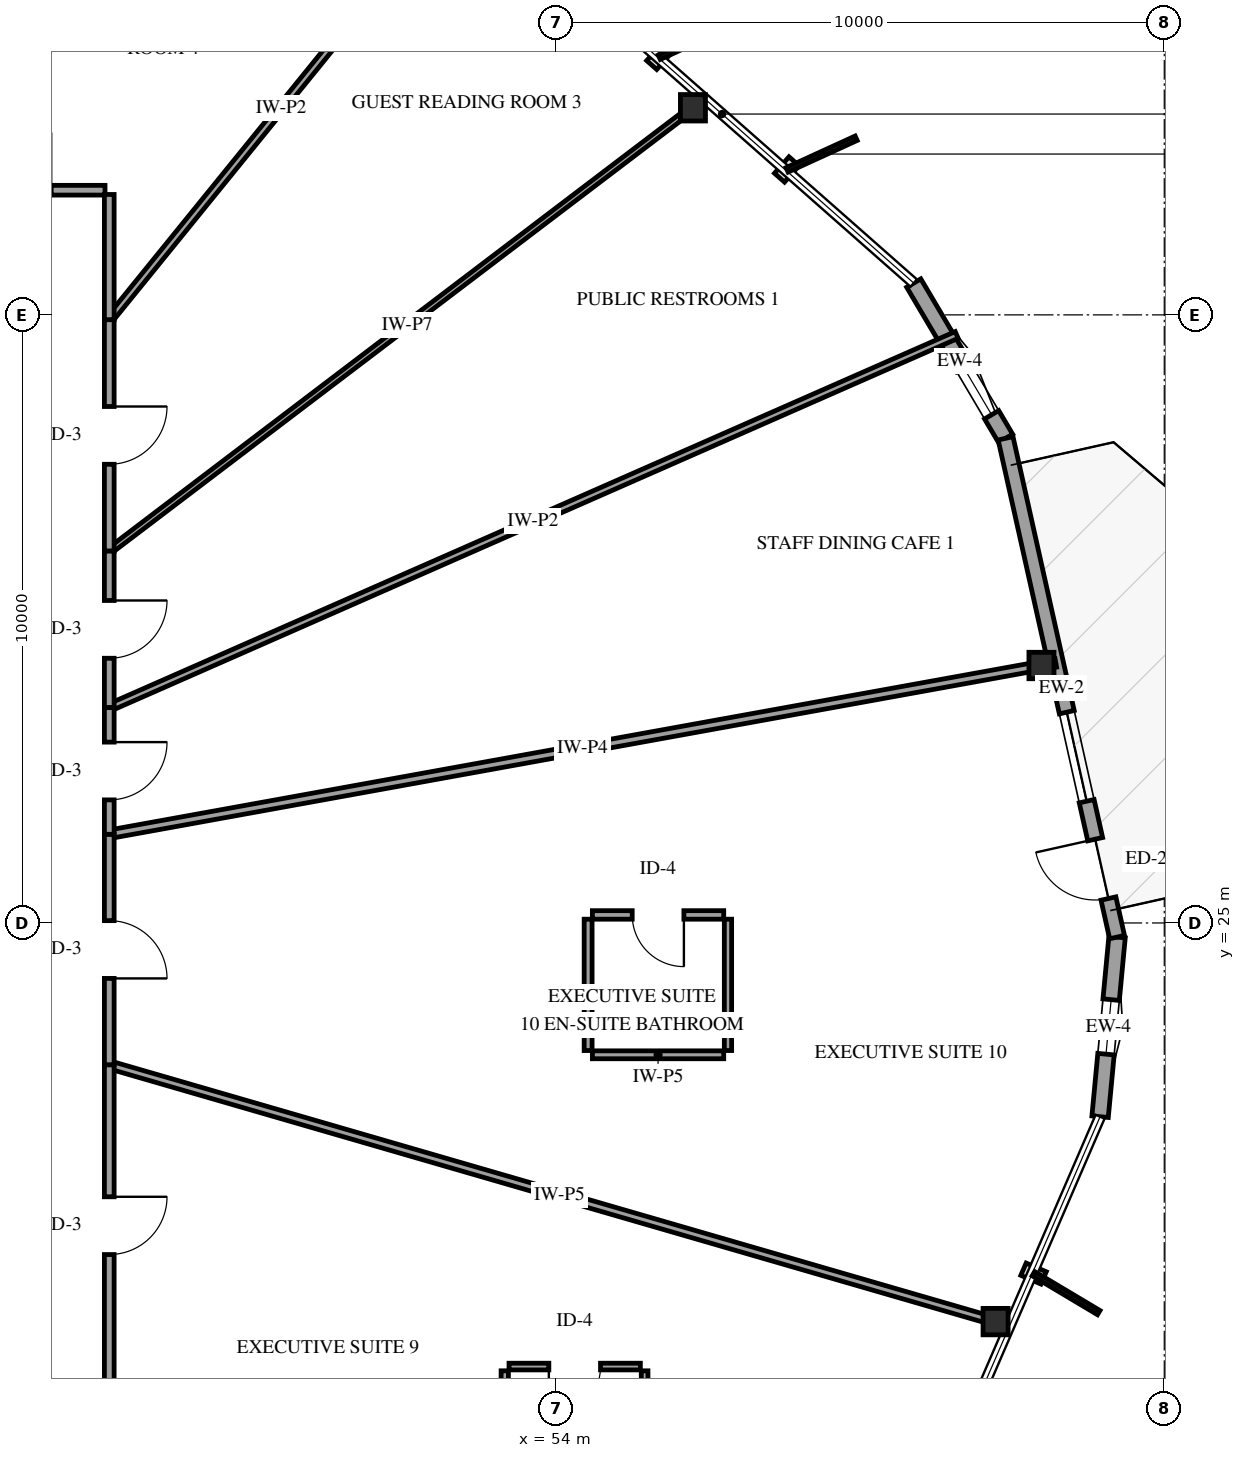
"""IFC4 building model, lengths in metres.
Left out: names, types, materials, properties, quantities, classifications, styles, units other than length and angle.
Written with IfcOpenShell. Run it as: python <this file> out.ifc"""

import sys

from ifc_helpers import new_model, si_unit, direction, frame, frame_2d, origin, origin_2d, place, context, subcontext, project, spatial, rectangle, i_section, extrude, element, fill, save


model = new_model("IFC4")
c1 = context("Model", 3, precision=1e-05, world=origin(), true_north=direction((0.0, 1.0)))
c2 = subcontext(c1, "Body", "Model", "MODEL_VIEW")
j1 = project(units=[si_unit("LENGTHUNIT", "METRE"), si_unit("PLANEANGLEUNIT", "RADIAN")], contexts=[c1])
p1 = place(None, origin())
s1 = spatial("IfcSite", under=j1, at=p1, CompositionType="ELEMENT")
p2 = place(p1, origin())
s2 = spatial("IfcBuilding", under=s1, at=p2, CompositionType="ELEMENT")
p3 = place(p2, frame((0.0, 0.0, 146.2)))
s3 = spatial("IfcBuildingStorey", under=s2, at=p3, CompositionType="ELEMENT", Elevation=146.2)
for number, where, z_axis, x_axis in (
    (1, (61.98, 29.234, 0.0), (0.0, 0.0, 1.0), (1.0, 0.0, 0.0)),
    (2, (56.249, 38.406, 0.0), (0.0, 0.0, 1.0), (1.0, 0.0, 0.0)),
    (3, (61.226, 18.444, 0.0), (0.0, 0.0, 1.0), (1.0, 0.0, 0.0)),
):
    element("IfcColumn", number, at=place(p3, frame(where, z_axis=z_axis, x_axis=x_axis)), inside=s3, PredefinedType="COLUMN", context=c2, shape_type="SweptSolid", body=[
        extrude(i_section(OverallWidth=0.412, OverallDepth=0.435, WebThickness=0.036, FlangeThickness=0.057, FilletRadius=0.038, at=origin_2d()), origin(), (0.0, 0.0, 1.0), 3.6),
    ])
p4 = place(p3, frame((62.944, 21.814, 0.0), z_axis=(0.0, 0.0, 1.0), x_axis=(0.094148838896, 0.995558132976, 0.0)))
e4 = element("IfcWall", 4, at=p4, inside=s3, PredefinedType="SOLIDWALL", context=c2, shape_type="SweptSolid", body=[
    extrude(rectangle(XDim=2.967, YDim=0.27, at=frame_2d((1.483, 0.0))), origin(), (0.0, 0.0, 1.0), 2.679),
])
p5 = place(p4, frame((1.033, 0.0, 0.75)))
e5 = element("IfcOpeningElement", 5, at=p5, cuts=e4, PredefinedType="OPENING", context=c2, shape_type="SweptSolid", body=[
    extrude(rectangle(XDim=0.9, YDim=1.5, at=frame_2d((0.45, 0.75))), frame((0.0, 0.145, 0.0), z_axis=(0.0, -1.0, 0.0), x_axis=(1.0, 0.0, 0.0)), (0.0, 0.0, 1.0), 0.29),
])
p6 = place(p3, frame((61.39, 32.97, 0.0), z_axis=(0.0, 0.0, 1.0), x_axis=(-0.509075841799, 0.860721666566, 0.0)))
e6 = element("IfcWall", 6, at=p6, inside=s3, PredefinedType="SOLIDWALL", context=c2, shape_type="SweptSolid", body=[
    extrude(rectangle(XDim=2.967, YDim=0.27, at=frame_2d((1.483, 0.0))), origin(), (0.0, 0.0, 1.0), 2.679),
])
p7 = place(p6, frame((0.45, 0.0, 0.75)))
e7 = element("IfcOpeningElement", 7, at=p7, cuts=e6, PredefinedType="OPENING", context=c2, shape_type="SweptSolid", body=[
    extrude(rectangle(XDim=0.9, YDim=1.5, at=frame_2d((0.45, 0.75))), frame((0.0, 0.145, 0.0), z_axis=(0.0, -1.0, 0.0), x_axis=(1.0, 0.0, 0.0)), (0.0, 0.0, 1.0), 0.29),
])
p8 = place(p3, frame((63.224, 24.767, 0.0), z_axis=(0.0, 0.0, 1.0), x_axis=(-0.218148242033, 0.975915644151, 0.0)))
e8 = element("IfcWall", 8, at=p8, inside=s3, PredefinedType="SOLIDWALL", context=c2, shape_type="SweptSolid", body=[
    extrude(rectangle(XDim=8.405, YDim=0.25, at=frame_2d((4.202, 0.0))), origin(), (0.0, 0.0, 1.0), 2.679),
])
p9 = place(p8, frame((0.65, 0.0, 0.0)))
e9 = element("IfcOpeningElement", 9, at=p9, cuts=e8, PredefinedType="OPENING", context=c2, shape_type="SweptSolid", body=[
    extrude(rectangle(XDim=1.0, YDim=2.15, at=frame_2d((0.5, 1.075))), frame((0.0, 0.135, 0.0), z_axis=(0.0, -1.0, 0.0), x_axis=(1.0, 0.0, 0.0)), (0.0, 0.0, 1.0), 0.27),
])
p10 = place(p8, frame((2.29, 0.0, 0.72)))
e10 = element("IfcOpeningElement", 10, at=p10, cuts=e8, PredefinedType="OPENING", context=c2, shape_type="SweptSolid", body=[
    extrude(rectangle(XDim=1.5, YDim=1.7, at=frame_2d((0.75, 0.85))), frame((0.0, 0.135, 0.0), z_axis=(0.0, -1.0, 0.0), x_axis=(1.0, 0.0, 0.0)), (0.0, 0.0, 1.0), 0.27),
])
p11 = place(p3, frame((62.216, 29.276, 0.0), z_axis=(0.0, 0.0, 1.0), x_axis=(-0.984006914284, -0.178130268741, 0.0)))
e11 = element("IfcWall", 11, at=p11, inside=s3, PredefinedType="PARTITIONING", context=c2, shape_type="SweptSolid", body=[
    extrude(rectangle(XDim=15.819, YDim=0.14, at=frame_2d((7.91, 0.0))), origin(), (0.0, 0.0, 1.0), 2.595),
])
p12 = place(p3, frame((46.65, 22.668, 0.0), z_axis=(0.0, 0.0, 1.0), x_axis=(0.96048207522, -0.278341845904, 0.0)))
e12 = element("IfcWall", 12, at=p12, inside=s3, PredefinedType="PARTITIONING", context=c2, shape_type="SweptSolid", body=[
    extrude(rectangle(XDim=15.416, YDim=0.13, at=frame_2d((7.708, 0.0))), origin(), (0.0, 0.0, 1.0), 3.3),
])
p13 = place(p3, frame((46.65, 28.541, 0.0), z_axis=(0.0, 0.0, 1.0), x_axis=(0.915386429194, 0.402576309844, 0.0)))
e13 = element("IfcWall", 13, at=p13, inside=s3, PredefinedType="PARTITIONING", context=c2, shape_type="SweptSolid", body=[
    extrude(rectangle(XDim=15.224, YDim=0.12, at=frame_2d((7.612, 0.0))), origin(), (0.0, 0.0, 1.0), 3.3),
])
p14 = place(p3, frame((46.65, 31.115, 0.0), z_axis=(0.0, 0.0, 1.0), x_axis=(0.796314037098, 0.604883422092, 0.0)))
e14 = element("IfcWall", 14, at=p14, inside=s3, PredefinedType="PARTITIONING", context=c2, shape_type="SweptSolid", body=[
    extrude(rectangle(XDim=12.298, YDim=0.1, at=frame_2d((6.149, 0.0))), origin(), (0.0, 0.0, 1.0), 3.3),
])
p15 = place(p3, frame((46.65, 34.921, 0.0), z_axis=(0.0, 0.0, 1.0), x_axis=(0.630132507275, 0.776487619524, 0.0)))
e15 = element("IfcWall", 15, at=p15, inside=s3, PredefinedType="PARTITIONING", context=c2, shape_type="SweptSolid", body=[
    extrude(rectangle(XDim=8.971, YDim=0.12, at=frame_2d((4.486, 0.0))), origin(), (0.0, 0.0, 1.0), 2.678),
])
p16 = place(p3, frame((43.86, 37.05, 0.0), z_axis=(0.0, 0.0, 1.0), x_axis=(0.400046288898, 0.916494935468, 0.0)))
e16 = element("IfcWall", 16, at=p16, inside=s3, PredefinedType="PARTITIONING", context=c2, shape_type="SweptSolid", body=[
    extrude(rectangle(XDim=6.152, YDim=0.14, at=frame_2d((3.076, 0.0))), origin(), (0.0, 0.0, 1.0), 2.595),
])
p17 = place(p3, frame((46.65, 22.668, 0.0), z_axis=(0.0, 0.0, 1.0), x_axis=(0.0, -1.0, 0.0)))
e17 = element("IfcWall", 17, at=p17, inside=s3, PredefinedType="PARTITIONING", context=c2, shape_type="SweptSolid", body=[
    extrude(rectangle(XDim=5.291, YDim=0.16, at=frame_2d((2.646, 0.0))), origin(), (0.0, 0.0, 1.0), 3.3),
])
p18 = place(p17, frame((2.171, 0.0, 0.0)))
e18 = element("IfcOpeningElement", 18, at=p18, cuts=e17, PredefinedType="OPENING", context=c2, shape_type="SweptSolid", body=[
    extrude(rectangle(XDim=0.95, YDim=2.15, at=frame_2d((0.475, 1.075))), frame((0.0, 0.09, 0.0), z_axis=(0.0, -1.0, 0.0), x_axis=(1.0, 0.0, 0.0)), (0.0, 0.0, 1.0), 0.18),
])
p19 = place(p3, frame((46.65, 34.921, 0.0), z_axis=(0.0, 0.0, 1.0), x_axis=(0.0, -1.0, 0.0)))
e19 = element("IfcWall", 19, at=p19, inside=s3, PredefinedType="PARTITIONING", context=c2, shape_type="SweptSolid", body=[
    extrude(rectangle(XDim=3.806, YDim=0.16, at=frame_2d((1.903, 0.0))), origin(), (0.0, 0.0, 1.0), 3.3),
])
p20 = place(p19, frame((1.428, 0.0, 0.0)))
e20 = element("IfcOpeningElement", 20, at=p20, cuts=e19, PredefinedType="OPENING", context=c2, shape_type="SweptSolid", body=[
    extrude(rectangle(XDim=0.95, YDim=2.15, at=frame_2d((0.475, 1.075))), frame((0.0, 0.09, 0.0), z_axis=(0.0, -1.0, 0.0), x_axis=(1.0, 0.0, 0.0)), (0.0, 0.0, 1.0), 0.18),
])
p21 = place(p3, frame((46.65, 26.458, 0.0), z_axis=(0.0, 0.0, 1.0), x_axis=(0.0, -1.0, 0.0)))
e21 = element("IfcWall", 21, at=p21, inside=s3, PredefinedType="PARTITIONING", context=c2, shape_type="SweptSolid", body=[
    extrude(rectangle(XDim=3.79, YDim=0.16, at=frame_2d((1.895, 0.0))), origin(), (0.0, 0.0, 1.0), 3.3),
])
p22 = place(p21, frame((1.42, 0.0, 0.0)))
e22 = element("IfcOpeningElement", 22, at=p22, cuts=e21, PredefinedType="OPENING", context=c2, shape_type="SweptSolid", body=[
    extrude(rectangle(XDim=0.95, YDim=2.15, at=frame_2d((0.475, 1.075))), frame((0.0, 0.09, 0.0), z_axis=(0.0, -1.0, 0.0), x_axis=(1.0, 0.0, 0.0)), (0.0, 0.0, 1.0), 0.18),
])
p23 = place(p3, frame((43.86, 37.05, 0.0), z_axis=(0.0, 0.0, 1.0), x_axis=(1.0, 0.0, 0.0)))
e23 = element("IfcWall", 23, at=p23, inside=s3, PredefinedType="PARTITIONING", context=c2, shape_type="SweptSolid", body=[
    extrude(rectangle(XDim=2.72, YDim=0.16, at=frame_2d((1.36, 0.0))), origin(), (0.0, 0.0, 1.0), 3.3),
])
p24 = place(p23, frame((0.885, 0.0, 0.0)))
e24 = element("IfcOpeningElement", 24, at=p24, cuts=e23, PredefinedType="OPENING", context=c2, shape_type="SweptSolid", body=[
    extrude(rectangle(XDim=0.95, YDim=2.15, at=frame_2d((0.475, 1.075))), frame((0.0, 0.09, 0.0), z_axis=(0.0, -1.0, 0.0), x_axis=(1.0, 0.0, 0.0)), (0.0, 0.0, 1.0), 0.18),
])
p25 = place(p3, frame((46.65, 31.115, 0.0), z_axis=(0.0, 0.0, 1.0), x_axis=(0.0, -1.0, 0.0)))
e25 = element("IfcWall", 25, at=p25, inside=s3, PredefinedType="PARTITIONING", context=c2, shape_type="SweptSolid", body=[
    extrude(rectangle(XDim=2.574, YDim=0.16, at=frame_2d((1.287, 0.0))), origin(), (0.0, 0.0, 1.0), 3.3),
])
p26 = place(p25, frame((0.812, 0.0, 0.0)))
e26 = element("IfcOpeningElement", 26, at=p26, cuts=e25, PredefinedType="OPENING", context=c2, shape_type="SweptSolid", body=[
    extrude(rectangle(XDim=0.95, YDim=2.15, at=frame_2d((0.475, 1.075))), frame((0.0, 0.09, 0.0), z_axis=(0.0, -1.0, 0.0), x_axis=(1.0, 0.0, 0.0)), (0.0, 0.0, 1.0), 0.18),
])
p27 = place(p3, frame((55.384, 17.705, 0.0), z_axis=(0.0, 0.0, 1.0), x_axis=(-1.0, 0.0, 0.0)))
e27 = element("IfcWall", 27, at=p27, inside=s3, PredefinedType="PARTITIONING", context=c2, shape_type="SweptSolid", body=[
    extrude(rectangle(XDim=2.16, YDim=0.11, at=frame_2d((1.08, 0.0))), origin(), (0.0, 0.0, 1.0), 3.3),
])
p28 = place(p27, frame((0.655, 0.0, 0.0)))
e28 = element("IfcOpeningElement", 28, at=p28, cuts=e27, PredefinedType="OPENING", context=c2, shape_type="SweptSolid", body=[
    extrude(rectangle(XDim=0.85, YDim=2.1, at=frame_2d((0.425, 1.05))), frame((0.0, 0.065, 0.0), z_axis=(0.0, -1.0, 0.0), x_axis=(1.0, 0.0, 0.0)), (0.0, 0.0, 1.0), 0.13),
])
p29 = place(p3, frame((56.755, 25.132, 0.0), z_axis=(0.0, 0.0, 1.0), x_axis=(-1.0, 0.0, 0.0)))
e29 = element("IfcWall", 29, at=p29, inside=s3, PredefinedType="PARTITIONING", context=c2, shape_type="SweptSolid", body=[
    extrude(rectangle(XDim=2.16, YDim=0.14, at=frame_2d((1.08, 0.0))), origin(), (0.0, 0.0, 1.0), 3.3),
])
p30 = place(p29, frame((0.655, 0.0, 0.0)))
e30 = element("IfcOpeningElement", 30, at=p30, cuts=e29, PredefinedType="OPENING", context=c2, shape_type="SweptSolid", body=[
    extrude(rectangle(XDim=0.85, YDim=2.1, at=frame_2d((0.425, 1.05))), frame((0.0, 0.08, 0.0), z_axis=(0.0, -1.0, 0.0), x_axis=(1.0, 0.0, 0.0)), (0.0, 0.0, 1.0), 0.16),
])
p31 = place(p3, frame((54.595, 22.832, 0.0), z_axis=(0.0, 0.0, 1.0), x_axis=(1.0, 0.0, 0.0)))
e31 = element("IfcWall", 31, at=p31, inside=s3, PredefinedType="PARTITIONING", context=c2, shape_type="SweptSolid", body=[
    extrude(rectangle(XDim=2.16, YDim=0.13, at=frame_2d((1.08, 0.0))), origin(), (0.0, 0.0, 1.0), 3.3),
])
p32 = place(p3, frame((53.154, 17.635, 0.0), z_axis=(0.0, 0.0, 1.0), x_axis=(0.0, -1.0, 0.0)))
e32 = element("IfcWall", 32, at=p32, inside=s3, PredefinedType="PARTITIONING", context=c2, shape_type="SweptSolid", body=[
    extrude(rectangle(XDim=2.16, YDim=0.12, at=frame_2d((1.08, 0.0))), origin(), (0.0, 0.0, 1.0), 3.3),
])
p33 = place(p3, frame((55.454, 15.475, 0.0), z_axis=(0.0, 0.0, 1.0), x_axis=(0.0, 1.0, 0.0)))
e33 = element("IfcWall", 33, at=p33, inside=s3, PredefinedType="PARTITIONING", context=c2, shape_type="SweptSolid", body=[
    extrude(rectangle(XDim=2.16, YDim=0.11, at=frame_2d((1.08, 0.0))), origin(), (0.0, 0.0, 1.0), 3.3),
])
p34 = place(p3, frame((54.525, 25.062, 0.0), z_axis=(0.0, 0.0, 1.0), x_axis=(0.0, -1.0, 0.0)))
e34 = element("IfcWall", 34, at=p34, inside=s3, PredefinedType="PARTITIONING", context=c2, shape_type="SweptSolid", body=[
    extrude(rectangle(XDim=2.16, YDim=0.13, at=frame_2d((1.08, 0.0))), origin(), (0.0, 0.0, 1.0), 3.3),
])
p35 = place(p3, frame((56.825, 22.902, 0.0), z_axis=(0.0, 0.0, 1.0), x_axis=(0.0, 1.0, 0.0)))
e35 = element("IfcWall", 35, at=p35, inside=s3, PredefinedType="PARTITIONING", context=c2, shape_type="SweptSolid", body=[
    extrude(rectangle(XDim=2.16, YDim=0.12, at=frame_2d((1.08, 0.0))), origin(), (0.0, 0.0, 1.0), 3.3),
])
p36 = place(p3, frame((46.65, 28.541, 0.0), z_axis=(0.0, 0.0, 1.0), x_axis=(0.0, -1.0, 0.0)))
e36 = element("IfcWall", 36, at=p36, inside=s3, PredefinedType="PARTITIONING", context=c2, shape_type="SweptSolid", body=[
    extrude(rectangle(XDim=2.083, YDim=0.16, at=frame_2d((1.042, 0.0))), origin(), (0.0, 0.0, 1.0), 3.3),
])
p37 = place(p36, frame((0.567, 0.0, 0.0)))
e37 = element("IfcOpeningElement", 37, at=p37, cuts=e36, PredefinedType="OPENING", context=c2, shape_type="SweptSolid", body=[
    extrude(rectangle(XDim=0.95, YDim=2.15, at=frame_2d((0.475, 1.075))), frame((0.0, 0.09, 0.0), z_axis=(0.0, -1.0, 0.0), x_axis=(1.0, 0.0, 0.0)), (0.0, 0.0, 1.0), 0.18),
])
p38 = place(p3, frame((46.65, 36.98, 0.0), z_axis=(0.0, 0.0, 1.0), x_axis=(0.0, -1.0, 0.0)))
e38 = element("IfcWall", 38, at=p38, inside=s3, PredefinedType="PARTITIONING", context=c2, shape_type="SweptSolid", body=[
    extrude(rectangle(XDim=2.059, YDim=0.16, at=frame_2d((1.03, 0.0))), origin(), (0.0, 0.0, 1.0), 3.3),
])
p39 = place(p5, origin())
e39 = element("IfcWindow", 39, at=p39, inside=s3, PartitioningType="SINGLE_PANEL", PredefinedType="WINDOW", context=c2, shape_type="SweptSolid", body=[
    extrude(rectangle(XDim=0.9, YDim=1.5, at=frame_2d((0.45, 0.75))), frame((0.0, 0.03, 0.0), z_axis=(0.0, -1.0, 0.0), x_axis=(1.0, 0.0, 0.0)), (0.0, 0.0, 1.0), 0.06),
])
fill(e5, e39)
p40 = place(p7, origin())
e40 = element("IfcWindow", 40, at=p40, inside=s3, PartitioningType="SINGLE_PANEL", PredefinedType="WINDOW", context=c2, shape_type="SweptSolid", body=[
    extrude(rectangle(XDim=0.9, YDim=1.5, at=frame_2d((0.45, 0.75))), frame((0.0, 0.03, 0.0), z_axis=(0.0, -1.0, 0.0), x_axis=(1.0, 0.0, 0.0)), (0.0, 0.0, 1.0), 0.06),
])
fill(e7, e40)
p41 = place(p9, origin())
e41 = element("IfcDoor", 41, at=p41, inside=s3, OperationType="SINGLE_SWING_RIGHT", PredefinedType="DOOR", context=c2, shape_type="SweptSolid", body=[
    extrude(rectangle(XDim=1.0, YDim=2.15, at=frame_2d((0.5, 1.075))), frame((0.0, 0.025, 0.0), z_axis=(0.0, -1.0, 0.0), x_axis=(1.0, 0.0, 0.0)), (0.0, 0.0, 1.0), 0.05),
])
fill(e9, e41)
p42 = place(p10, origin())
e42 = element("IfcWindow", 42, at=p42, inside=s3, PartitioningType="SINGLE_PANEL", PredefinedType="WINDOW", context=c2, shape_type="SweptSolid", body=[
    extrude(rectangle(XDim=1.5, YDim=1.7, at=frame_2d((0.75, 0.85))), frame((0.0, 0.03, 0.0), z_axis=(0.0, -1.0, 0.0), x_axis=(1.0, 0.0, 0.0)), (0.0, 0.0, 1.0), 0.06),
])
fill(e10, e42)
p43 = place(p18, origin())
e43 = element("IfcDoor", 43, at=p43, inside=s3, OperationType="SINGLE_SWING_LEFT", PredefinedType="DOOR", context=c2, shape_type="SweptSolid", body=[
    extrude(rectangle(XDim=0.95, YDim=2.15, at=frame_2d((0.475, 1.075))), frame((0.0, 0.025, 0.0), z_axis=(0.0, -1.0, 0.0), x_axis=(1.0, 0.0, 0.0)), (0.0, 0.0, 1.0), 0.05),
])
fill(e18, e43)
p44 = place(p20, origin())
e44 = element("IfcDoor", 44, at=p44, inside=s3, OperationType="SINGLE_SWING_LEFT", PredefinedType="DOOR", context=c2, shape_type="SweptSolid", body=[
    extrude(rectangle(XDim=0.95, YDim=2.15, at=frame_2d((0.475, 1.075))), frame((0.0, 0.025, 0.0), z_axis=(0.0, -1.0, 0.0), x_axis=(1.0, 0.0, 0.0)), (0.0, 0.0, 1.0), 0.05),
])
fill(e20, e44)
p45 = place(p22, origin())
e45 = element("IfcDoor", 45, at=p45, inside=s3, OperationType="SINGLE_SWING_RIGHT", PredefinedType="DOOR", context=c2, shape_type="SweptSolid", body=[
    extrude(rectangle(XDim=0.95, YDim=2.15, at=frame_2d((0.475, 1.075))), frame((0.0, 0.025, 0.0), z_axis=(0.0, -1.0, 0.0), x_axis=(1.0, 0.0, 0.0)), (0.0, 0.0, 1.0), 0.05),
])
fill(e22, e45)
p46 = place(p26, origin())
e46 = element("IfcDoor", 46, at=p46, inside=s3, OperationType="SINGLE_SWING_LEFT", PredefinedType="DOOR", context=c2, shape_type="SweptSolid", body=[
    extrude(rectangle(XDim=0.95, YDim=2.15, at=frame_2d((0.475, 1.075))), frame((0.0, 0.025, 0.0), z_axis=(0.0, -1.0, 0.0), x_axis=(1.0, 0.0, 0.0)), (0.0, 0.0, 1.0), 0.05),
])
fill(e26, e46)
p47 = place(p28, origin())
e47 = element("IfcDoor", 47, at=p47, inside=s3, OperationType="SINGLE_SWING_RIGHT", PredefinedType="DOOR", context=c2, shape_type="SweptSolid", body=[
    extrude(rectangle(XDim=0.85, YDim=2.1, at=frame_2d((0.425, 1.05))), frame((0.0, 0.025, 0.0), z_axis=(0.0, -1.0, 0.0), x_axis=(1.0, 0.0, 0.0)), (0.0, 0.0, 1.0), 0.05),
])
fill(e28, e47)
p48 = place(p30, origin())
e48 = element("IfcDoor", 48, at=p48, inside=s3, OperationType="SINGLE_SWING_LEFT", PredefinedType="DOOR", context=c2, shape_type="SweptSolid", body=[
    extrude(rectangle(XDim=0.85, YDim=2.1, at=frame_2d((0.425, 1.05))), frame((0.0, 0.025, 0.0), z_axis=(0.0, -1.0, 0.0), x_axis=(1.0, 0.0, 0.0)), (0.0, 0.0, 1.0), 0.05),
])
fill(e30, e48)
p49 = place(p37, origin())
e49 = element("IfcDoor", 49, at=p49, inside=s3, OperationType="SINGLE_SWING_LEFT", PredefinedType="DOOR", context=c2, shape_type="SweptSolid", body=[
    extrude(rectangle(XDim=0.95, YDim=2.15, at=frame_2d((0.475, 1.075))), frame((0.0, 0.025, 0.0), z_axis=(0.0, -1.0, 0.0), x_axis=(1.0, 0.0, 0.0)), (0.0, 0.0, 1.0), 0.05),
])
fill(e37, e49)
save(model, sys.argv[1])
